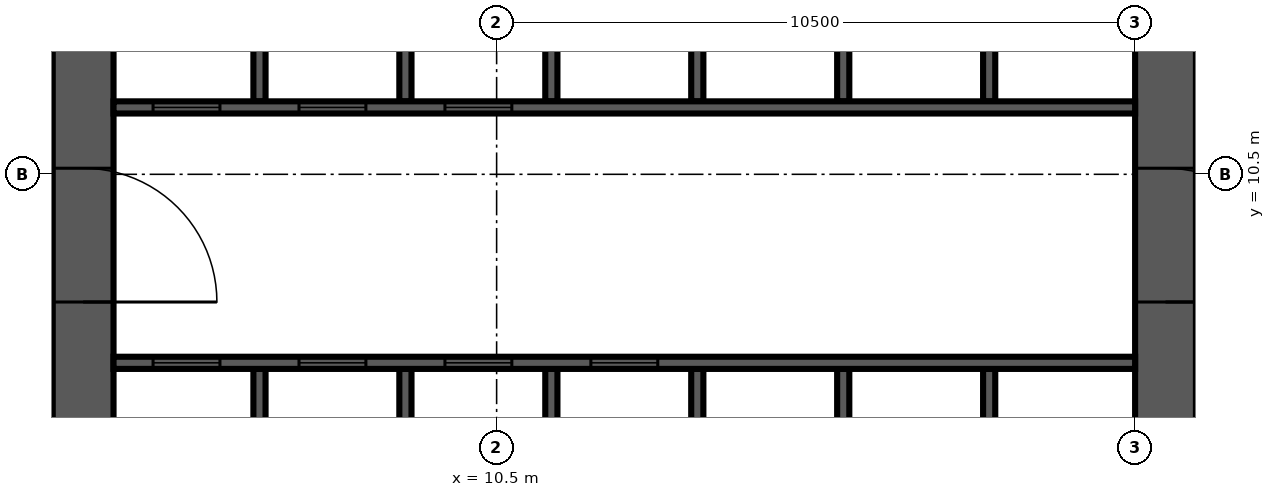
"""IFC4 building model, lengths in metres.
Left out: names, types, materials, properties, quantities, classifications, styles, units other than length and angle.
Written with IfcOpenShell. Run it as: python <this file> out.ifc"""

import sys

from ifc_helpers import new_model, si_unit, direction, frame, frame_2d, origin, place, context, subcontext, project, spatial, rectangle, extrude, source, transform, mapped, element, fill, save


model = new_model("IFC4")
c1 = context("Model", 3, precision=1e-05, world=origin(), true_north=direction((0.0, 1.0)))
c2 = subcontext(c1, "Body", "Model", "MODEL_VIEW")
j1 = project(units=[si_unit("LENGTHUNIT", "METRE"), si_unit("PLANEANGLEUNIT", "RADIAN")], contexts=[c1])
p1 = place(None, origin())
s1 = spatial("IfcSite", under=j1, at=p1, CompositionType="ELEMENT")
p2 = place(p1, origin())
s2 = spatial("IfcBuilding", under=s1, at=p2, CompositionType="ELEMENT")
p3 = place(p2, frame((0.0, 0.0, 120.3)))
s3 = spatial("IfcBuildingStorey", under=s2, at=p3, CompositionType="ELEMENT", Elevation=120.3)
m1 = source(origin(), c2, "Body", "SweptSolid", [
    extrude(rectangle(XDim=17.8, YDim=1.0, at=frame_2d((8.9, 0.0))), origin(), (0.0, 0.0, 1.0), 4.2),
])
p4 = place(p3, frame((3.7, 4.2, 0.0), z_axis=(0.0, 0.0, 1.0), x_axis=(0.0, 1.0, 0.0)))
e1 = element("IfcWall", 1, at=p4, inside=s3, PredefinedType="SHEAR", context=c2, shape_type="MappedRepresentation", body=[
    mapped(m1, transform((0.0, 0.0, 0.0), scale=1.0)),
])
m2 = source(origin(), c2, "Body", "SweptSolid", [
    extrude(rectangle(XDim=2.2, YDim=2.1, at=frame_2d((1.1, 1.05))), frame((0.0, 0.51, 0.0), z_axis=(0.0, -1.0, 0.0), x_axis=(1.0, 0.0, 0.0)), (0.0, 0.0, 1.0), 1.02),
])
p5 = place(p4, frame((4.2, 0.0, 0.0)))
e2 = element("IfcOpeningElement", 2, at=p5, cuts=e1, PredefinedType="OPENING", context=c2, shape_type="MappedRepresentation", body=[
    mapped(m2, transform((0.0, 0.0, 0.0), scale=1.0)),
])
m3 = source(origin(), c2, "Body", "SweptSolid", [
    extrude(rectangle(XDim=0.9, YDim=2.1, at=frame_2d((0.45, 1.05))), frame((0.0, 0.51, 0.0), z_axis=(0.0, -1.0, 0.0), x_axis=(1.0, 0.0, 0.0)), (0.0, 0.0, 1.0), 1.02),
])
p6 = place(p4, frame((10.95, 0.0, 0.0)))
e3 = element("IfcOpeningElement", 3, at=p6, cuts=e1, PredefinedType="OPENING", context=c2, shape_type="MappedRepresentation", body=[
    mapped(m3, transform((0.0, 0.0, 0.0), scale=1.0)),
])
m4 = source(origin(), c2, "Body", "SweptSolid", [
    extrude(rectangle(XDim=16.8, YDim=1.0, at=frame_2d((8.4, 0.0))), origin(), (0.0, 0.0, 1.0), 4.2),
])
p7 = place(p3, frame((21.5, 4.2, 0.0), z_axis=(0.0, 0.0, 1.0), x_axis=(0.0, 1.0, 0.0)))
e4 = element("IfcWall", 4, at=p7, inside=s3, PredefinedType="SHEAR", context=c2, shape_type="MappedRepresentation", body=[
    mapped(m4, transform((0.0, 0.0, 0.0), scale=1.0)),
])
p8 = place(p7, frame((4.2, 0.0, 0.0)))
e5 = element("IfcOpeningElement", 5, at=p8, cuts=e4, PredefinedType="OPENING", context=c2, shape_type="MappedRepresentation", body=[
    mapped(m2, transform((0.0, 0.0, 0.0), scale=1.0)),
])
m5 = source(origin(), c2, "Body", "SweptSolid", [
    extrude(rectangle(XDim=1.2, YDim=2.1, at=frame_2d((0.6, 1.05))), frame((0.0, 0.51, 0.0), z_axis=(0.0, -1.0, 0.0), x_axis=(1.0, 0.0, 0.0)), (0.0, 0.0, 1.0), 1.02),
])
p9 = place(p7, frame((14.7, 0.0, 0.0)))
e6 = element("IfcOpeningElement", 6, at=p9, cuts=e4, PredefinedType="OPENING", context=c2, shape_type="MappedRepresentation", body=[
    mapped(m5, transform((0.0, 0.0, 0.0), scale=1.0)),
])
m6 = source(origin(), c2, "Body", "SweptSolid", [
    extrude(rectangle(XDim=3.1, YDim=0.2, at=frame_2d((1.55, 0.0))), origin(), (0.0, 0.0, 1.0), 4.2),
])
for number, where, z_axis, x_axis in (
    (7, (6.6, 4.2, 0.0), (0.0, 0.0, 1.0), (0.0, 1.0, 0.0)),
    (8, (9.0, 4.2, 0.0), (0.0, 0.0, 1.0), (0.0, 1.0, 0.0)),
    (9, (11.4, 4.2, 0.0), (0.0, 0.0, 1.0), (0.0, 1.0, 0.0)),
    (10, (13.8, 4.2, 0.0), (0.0, 0.0, 1.0), (0.0, 1.0, 0.0)),
    (11, (16.2, 4.2, 0.0), (0.0, 0.0, 1.0), (0.0, 1.0, 0.0)),
    (12, (18.6, 4.2, 0.0), (0.0, 0.0, 1.0), (0.0, 1.0, 0.0)),
):
    element("IfcWall", number, at=place(p3, frame(where, z_axis=z_axis, x_axis=x_axis)), inside=s3, PredefinedType="SOLIDWALL", context=c2, shape_type="MappedRepresentation", body=[
        mapped(m6, transform((0.0, 0.0, 0.0), scale=1.0)),
    ])
m7 = source(origin(), c2, "Body", "SweptSolid", [
    extrude(rectangle(XDim=3.0, YDim=0.2, at=frame_2d((1.5, 0.0))), origin(), (0.0, 0.0, 1.0), 4.2),
])
for number, where, z_axis, x_axis in (
    (13, (6.6, 11.7, 0.0), (0.0, 0.0, 1.0), (0.0, 1.0, 0.0)),
    (14, (9.0, 11.7, 0.0), (0.0, 0.0, 1.0), (0.0, 1.0, 0.0)),
    (15, (11.4, 11.7, 0.0), (0.0, 0.0, 1.0), (0.0, 1.0, 0.0)),
    (16, (13.8, 11.7, 0.0), (0.0, 0.0, 1.0), (0.0, 1.0, 0.0)),
    (17, (16.2, 11.7, 0.0), (0.0, 0.0, 1.0), (0.0, 1.0, 0.0)),
    (18, (18.6, 11.7, 0.0), (0.0, 0.0, 1.0), (0.0, 1.0, 0.0)),
):
    element("IfcWall", number, at=place(p3, frame(where, z_axis=z_axis, x_axis=x_axis)), inside=s3, PredefinedType="SOLIDWALL", context=c2, shape_type="MappedRepresentation", body=[
        mapped(m7, transform((0.0, 0.0, 0.0), scale=1.0)),
    ])
m8 = source(origin(), c2, "Body", "SweptSolid", [
    extrude(rectangle(XDim=16.8, YDim=0.2, at=frame_2d((8.4, 0.0))), origin(), (0.0, 0.0, 1.0), 4.2),
])
p10 = place(p3, frame((4.2, 7.4, 0.0), z_axis=(0.0, 0.0, 1.0), x_axis=(1.0, 0.0, 0.0)))
e19 = element("IfcWall", 19, at=p10, inside=s3, PredefinedType="SOLIDWALL", context=c2, shape_type="MappedRepresentation", body=[
    mapped(m8, transform((0.0, 0.0, 0.0), scale=1.0)),
])
m9 = source(origin(), c2, "Body", "SweptSolid", [
    extrude(rectangle(XDim=1.1, YDim=2.1, at=frame_2d((0.55, 1.05))), frame((0.0, 0.11, 0.0), z_axis=(0.0, -1.0, 0.0), x_axis=(1.0, 0.0, 0.0)), (0.0, 0.0, 1.0), 0.22),
])
p11 = place(p10, frame((0.65, 0.0, 0.0)))
e20 = element("IfcOpeningElement", 20, at=p11, cuts=e19, PredefinedType="OPENING", context=c2, shape_type="MappedRepresentation", body=[
    mapped(m9, transform((0.0, 0.0, 0.0), scale=1.0)),
])
p12 = place(p10, frame((3.05, 0.0, 0.0)))
e21 = element("IfcOpeningElement", 21, at=p12, cuts=e19, PredefinedType="OPENING", context=c2, shape_type="MappedRepresentation", body=[
    mapped(m9, transform((0.0, 0.0, 0.0), scale=1.0)),
])
p13 = place(p10, frame((5.45, 0.0, 0.0)))
e22 = element("IfcOpeningElement", 22, at=p13, cuts=e19, PredefinedType="OPENING", context=c2, shape_type="MappedRepresentation", body=[
    mapped(m9, transform((0.0, 0.0, 0.0), scale=1.0)),
])
p14 = place(p10, frame((7.85, 0.0, 0.0)))
e23 = element("IfcOpeningElement", 23, at=p14, cuts=e19, PredefinedType="OPENING", context=c2, shape_type="MappedRepresentation", body=[
    mapped(m9, transform((0.0, 0.0, 0.0), scale=1.0)),
])
p15 = place(p3, frame((4.2, 11.6, 0.0), z_axis=(0.0, 0.0, 1.0), x_axis=(1.0, 0.0, 0.0)))
e24 = element("IfcWall", 24, at=p15, inside=s3, PredefinedType="SOLIDWALL", context=c2, shape_type="MappedRepresentation", body=[
    mapped(m8, transform((0.0, 0.0, 0.0), scale=1.0)),
])
p16 = place(p15, frame((0.65, 0.0, 0.0)))
e25 = element("IfcOpeningElement", 25, at=p16, cuts=e24, PredefinedType="OPENING", context=c2, shape_type="MappedRepresentation", body=[
    mapped(m9, transform((0.0, 0.0, 0.0), scale=1.0)),
])
p17 = place(p15, frame((3.05, 0.0, 0.0)))
e26 = element("IfcOpeningElement", 26, at=p17, cuts=e24, PredefinedType="OPENING", context=c2, shape_type="MappedRepresentation", body=[
    mapped(m9, transform((0.0, 0.0, 0.0), scale=1.0)),
])
p18 = place(p15, frame((5.45, 0.0, 0.0)))
e27 = element("IfcOpeningElement", 27, at=p18, cuts=e24, PredefinedType="OPENING", context=c2, shape_type="MappedRepresentation", body=[
    mapped(m9, transform((0.0, 0.0, 0.0), scale=1.0)),
])
m10 = source(origin(), c2, "Body", "SweptSolid", [
    extrude(rectangle(XDim=1.1, YDim=2.1, at=frame_2d((0.55, 1.05))), frame((0.0, 0.025, 0.0), z_axis=(0.0, -1.0, 0.0), x_axis=(1.0, 0.0, 0.0)), (0.0, 0.0, 1.0), 0.05),
])
p19 = place(p11, origin())
e28 = element("IfcDoor", 28, at=p19, inside=s3, OperationType="SLIDING_TO_LEFT", PredefinedType="DOOR", context=c2, shape_type="MappedRepresentation", body=[
    mapped(m10, transform((0.0, 0.0, 0.0), scale=1.0)),
])
fill(e20, e28)
p20 = place(p12, origin())
e29 = element("IfcDoor", 29, at=p20, inside=s3, OperationType="SLIDING_TO_LEFT", PredefinedType="DOOR", context=c2, shape_type="MappedRepresentation", body=[
    mapped(m10, transform((0.0, 0.0, 0.0), scale=1.0)),
])
fill(e21, e29)
p21 = place(p13, origin())
e30 = element("IfcDoor", 30, at=p21, inside=s3, OperationType="SLIDING_TO_LEFT", PredefinedType="DOOR", context=c2, shape_type="MappedRepresentation", body=[
    mapped(m10, transform((0.0, 0.0, 0.0), scale=1.0)),
])
fill(e22, e30)
p22 = place(p14, origin())
e31 = element("IfcDoor", 31, at=p22, inside=s3, OperationType="SLIDING_TO_LEFT", PredefinedType="DOOR", context=c2, shape_type="MappedRepresentation", body=[
    mapped(m10, transform((0.0, 0.0, 0.0), scale=1.0)),
])
fill(e23, e31)
p23 = place(p16, origin())
e32 = element("IfcDoor", 32, at=p23, inside=s3, OperationType="SLIDING_TO_LEFT", PredefinedType="DOOR", context=c2, shape_type="MappedRepresentation", body=[
    mapped(m10, transform((0.0, 0.0, 0.0), scale=1.0)),
])
fill(e25, e32)
p24 = place(p17, origin())
e33 = element("IfcDoor", 33, at=p24, inside=s3, OperationType="SLIDING_TO_LEFT", PredefinedType="DOOR", context=c2, shape_type="MappedRepresentation", body=[
    mapped(m10, transform((0.0, 0.0, 0.0), scale=1.0)),
])
fill(e26, e33)
p25 = place(p18, origin())
e34 = element("IfcDoor", 34, at=p25, inside=s3, OperationType="SLIDING_TO_LEFT", PredefinedType="DOOR", context=c2, shape_type="MappedRepresentation", body=[
    mapped(m10, transform((0.0, 0.0, 0.0), scale=1.0)),
])
fill(e27, e34)
m11 = source(origin(), c2, "Body", "SweptSolid", [
    extrude(rectangle(XDim=2.2, YDim=2.1, at=frame_2d((1.1, 1.05))), frame((0.0, 0.025, 0.0), z_axis=(0.0, -1.0, 0.0), x_axis=(1.0, 0.0, 0.0)), (0.0, 0.0, 1.0), 0.05),
])
p26 = place(p8, origin())
e35 = element("IfcDoor", 35, at=p26, inside=s3, OperationType="DOUBLE_DOOR_SINGLE_SWING", PredefinedType="DOOR", context=c2, shape_type="MappedRepresentation", body=[
    mapped(m11, transform((0.0, 0.0, 0.0), scale=1.0)),
])
fill(e5, e35)
p27 = place(p5, origin())
e36 = element("IfcDoor", 36, at=p27, inside=s3, OperationType="DOUBLE_DOOR_SINGLE_SWING", PredefinedType="DOOR", context=c2, shape_type="MappedRepresentation", body=[
    mapped(m11, transform((0.0, 0.0, 0.0), scale=1.0)),
])
fill(e2, e36)
save(model, sys.argv[1])
